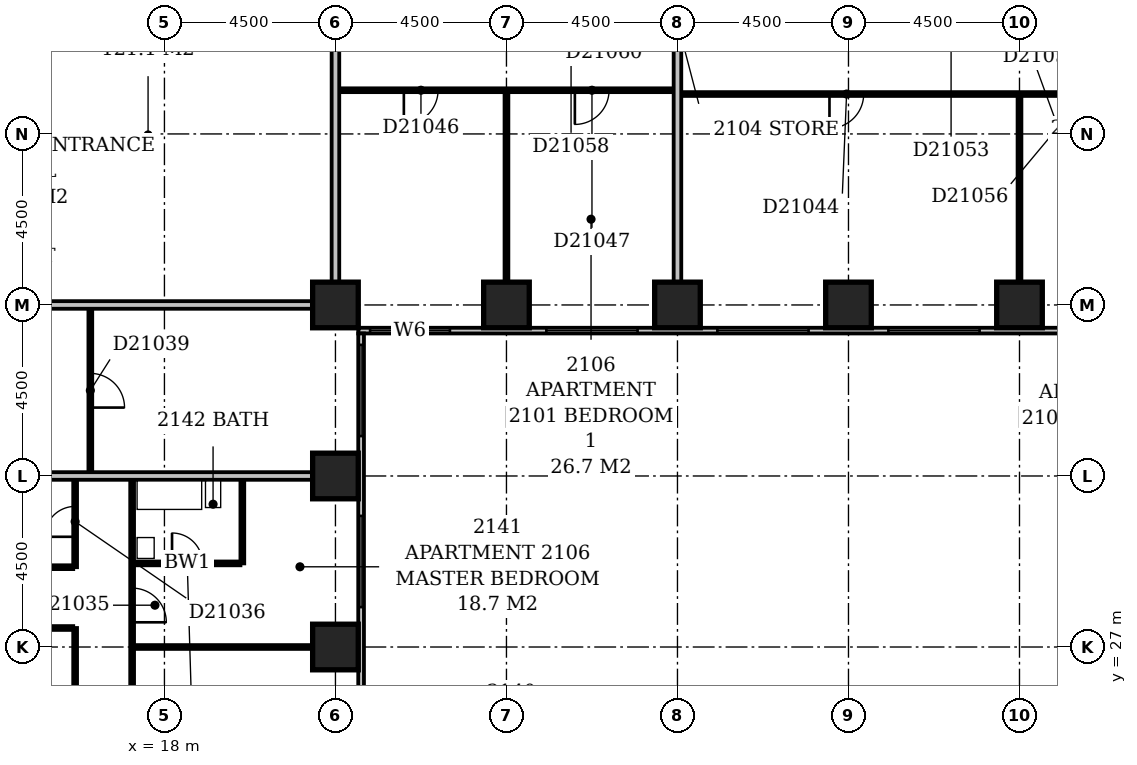
"""IFC4 building model, lengths in metres.
Left out: names, types, materials, properties, quantities, classifications, styles, units other than length and angle.
Written with IfcOpenShell. Run it as: python <this file> out.ifc"""

import sys

from ifc_helpers import new_model, si_unit, direction, frame, frame_2d, origin, origin_2d, place, context, subcontext, project, spatial, rectangle, extrude, element, fill, save


model = new_model("IFC4")
c1 = context("Model", 3, precision=1e-05, world=origin(), true_north=direction((0.0, 1.0)))
c2 = subcontext(c1, "Body", "Model", "MODEL_VIEW")
j1 = project(units=[si_unit("LENGTHUNIT", "METRE"), si_unit("PLANEANGLEUNIT", "RADIAN")], contexts=[c1])
p1 = place(None, origin())
s1 = spatial("IfcSite", under=j1, at=p1, CompositionType="ELEMENT")
p2 = place(p1, origin())
s2 = spatial("IfcBuilding", under=s1, at=p2, CompositionType="ELEMENT")
p3 = place(p2, frame((0.0, 0.0, 86.6)))
s3 = spatial("IfcBuildingStorey", under=s2, at=p3, CompositionType="ELEMENT", Elevation=86.6)
for number, where, z_axis, x_axis in (
    (1, (22.5, 27.0, -0.3), (0.0, 0.0, 1.0), (1.0, 0.0, 0.0)),
    (2, (22.5, 31.5, -0.3), (0.0, 0.0, 1.0), (1.0, 0.0, 0.0)),
    (3, (22.5, 36.0, -0.3), (0.0, 0.0, 1.0), (1.0, 0.0, 0.0)),
    (4, (27.0, 36.0, -0.3), (0.0, 0.0, 1.0), (1.0, 0.0, 0.0)),
    (5, (31.5, 36.0, -0.3), (0.0, 0.0, 1.0), (1.0, 0.0, 0.0)),
    (6, (36.0, 36.0, -0.3), (0.0, 0.0, 1.0), (1.0, 0.0, 0.0)),
    (7, (40.5, 36.0, -0.3), (0.0, 0.0, 1.0), (1.0, 0.0, 0.0)),
):
    element("IfcColumn", number, at=place(p3, frame(where, z_axis=z_axis, x_axis=x_axis)), inside=s3, PredefinedType="COLUMN", context=c2, shape_type="SweptSolid", body=[
        extrude(rectangle(XDim=1.2, YDim=1.2, at=origin_2d()), origin(), (0.0, 0.0, 1.0), 3.6),
    ])
p4 = place(p3, frame((23.175, 17.4, 0.0), z_axis=(0.0, 0.0, 1.0), x_axis=(0.0, 1.0, 0.0)))
e8 = element("IfcWall", 8, at=p4, inside=s3, PredefinedType="STANDARD", context=c2, shape_type="SweptSolid", body=[
    extrude(rectangle(XDim=17.85, YDim=0.15, at=frame_2d((8.925, 0.0))), origin(), (0.0, 0.0, 1.0), 2.7),
])
p5 = place(p4, frame((1.435, 0.0, 0.6)))
e9 = element("IfcOpeningElement", 9, at=p5, cuts=e8, PredefinedType="OPENING", context=c2, shape_type="SweptSolid", body=[
    extrude(rectangle(XDim=2.1, YDim=1.8, at=frame_2d((1.05, 0.9))), frame((0.0, 0.087, 0.0), z_axis=(0.0, -1.0, 0.0), x_axis=(1.0, 0.0, 0.0)), (0.0, 0.0, 1.0), 0.174),
])
p6 = place(p4, frame((6.15, 0.0, 0.6)))
e10 = element("IfcOpeningElement", 10, at=p6, cuts=e8, PredefinedType="OPENING", context=c2, shape_type="SweptSolid", body=[
    extrude(rectangle(XDim=2.4, YDim=1.8, at=frame_2d((1.2, 0.9))), frame((0.0, 0.087, 0.0), z_axis=(0.0, -1.0, 0.0), x_axis=(1.0, 0.0, 0.0)), (0.0, 0.0, 1.0), 0.174),
])
p7 = place(p4, frame((10.65, 0.0, 0.6)))
e11 = element("IfcOpeningElement", 11, at=p7, cuts=e8, PredefinedType="OPENING", context=c2, shape_type="SweptSolid", body=[
    extrude(rectangle(XDim=2.4, YDim=1.8, at=frame_2d((1.2, 0.9))), frame((0.0, 0.087, 0.0), z_axis=(0.0, -1.0, 0.0), x_axis=(1.0, 0.0, 0.0)), (0.0, 0.0, 1.0), 0.174),
])
p8 = place(p4, frame((15.15, 0.0, 0.6)))
e12 = element("IfcOpeningElement", 12, at=p8, cuts=e8, PredefinedType="OPENING", context=c2, shape_type="SweptSolid", body=[
    extrude(rectangle(XDim=2.4, YDim=1.8, at=frame_2d((1.2, 0.9))), frame((0.0, 0.087, 0.0), z_axis=(0.0, -1.0, 0.0), x_axis=(1.0, 0.0, 0.0)), (0.0, 0.0, 1.0), 0.174),
])
p9 = place(p3, frame((23.1, 35.325, 0.0), z_axis=(0.0, 0.0, 1.0), x_axis=(1.0, 0.0, 0.0)))
e13 = element("IfcWall", 13, at=p9, inside=s3, PredefinedType="STANDARD", context=c2, shape_type="SweptSolid", body=[
    extrude(rectangle(XDim=45.15, YDim=0.15, at=frame_2d((22.575, 0.0))), origin(), (0.0, 0.0, 1.0), 2.7),
])
p10 = place(p9, frame((0.312, 0.0, 0.6)))
e14 = element("IfcOpeningElement", 14, at=p10, cuts=e13, PredefinedType="OPENING", context=c2, shape_type="SweptSolid", body=[
    extrude(rectangle(XDim=2.1, YDim=1.8, at=frame_2d((1.05, 0.9))), frame((0.0, 0.087, 0.0), z_axis=(0.0, -1.0, 0.0), x_axis=(1.0, 0.0, 0.0)), (0.0, 0.0, 1.0), 0.174),
])
p11 = place(p9, frame((4.95, 0.0, 0.6)))
e15 = element("IfcOpeningElement", 15, at=p11, cuts=e13, PredefinedType="OPENING", context=c2, shape_type="SweptSolid", body=[
    extrude(rectangle(XDim=2.4, YDim=1.8, at=frame_2d((1.2, 0.9))), frame((0.0, 0.087, 0.0), z_axis=(0.0, -1.0, 0.0), x_axis=(1.0, 0.0, 0.0)), (0.0, 0.0, 1.0), 0.174),
])
p12 = place(p9, frame((9.45, 0.0, 0.6)))
e16 = element("IfcOpeningElement", 16, at=p12, cuts=e13, PredefinedType="OPENING", context=c2, shape_type="SweptSolid", body=[
    extrude(rectangle(XDim=2.4, YDim=1.8, at=frame_2d((1.2, 0.9))), frame((0.0, 0.087, 0.0), z_axis=(0.0, -1.0, 0.0), x_axis=(1.0, 0.0, 0.0)), (0.0, 0.0, 1.0), 0.174),
])
p13 = place(p9, frame((13.95, 0.0, 0.6)))
e17 = element("IfcOpeningElement", 17, at=p13, cuts=e13, PredefinedType="OPENING", context=c2, shape_type="SweptSolid", body=[
    extrude(rectangle(XDim=2.4, YDim=1.8, at=frame_2d((1.2, 0.9))), frame((0.0, 0.087, 0.0), z_axis=(0.0, -1.0, 0.0), x_axis=(1.0, 0.0, 0.0)), (0.0, 0.0, 1.0), 0.174),
])
p14 = place(p9, frame((18.45, 0.0, 0.6)))
e18 = element("IfcOpeningElement", 18, at=p14, cuts=e13, PredefinedType="OPENING", context=c2, shape_type="SweptSolid", body=[
    extrude(rectangle(XDim=2.4, YDim=1.8, at=frame_2d((1.2, 0.9))), frame((0.0, 0.087, 0.0), z_axis=(0.0, -1.0, 0.0), x_axis=(1.0, 0.0, 0.0)), (0.0, 0.0, 1.0), 0.174),
])
p15 = place(p9, frame((24.097, 0.0, 0.6)))
e19 = element("IfcOpeningElement", 19, at=p15, cuts=e13, PredefinedType="OPENING", context=c2, shape_type="SweptSolid", body=[
    extrude(rectangle(XDim=1.5, YDim=1.8, at=frame_2d((0.75, 0.9))), frame((0.0, 0.087, 0.0), z_axis=(0.0, -1.0, 0.0), x_axis=(1.0, 0.0, 0.0)), (0.0, 0.0, 1.0), 0.174),
])
p16 = place(p9, frame((27.331, 0.0, 0.6)))
e20 = element("IfcOpeningElement", 20, at=p16, cuts=e13, PredefinedType="OPENING", context=c2, shape_type="SweptSolid", body=[
    extrude(rectangle(XDim=2.1, YDim=1.8, at=frame_2d((1.05, 0.9))), frame((0.0, 0.087, 0.0), z_axis=(0.0, -1.0, 0.0), x_axis=(1.0, 0.0, 0.0)), (0.0, 0.0, 1.0), 0.174),
])
p17 = place(p9, frame((31.95, 0.0, 0.6)))
e21 = element("IfcOpeningElement", 21, at=p17, cuts=e13, PredefinedType="OPENING", context=c2, shape_type="SweptSolid", body=[
    extrude(rectangle(XDim=2.4, YDim=1.8, at=frame_2d((1.2, 0.9))), frame((0.0, 0.087, 0.0), z_axis=(0.0, -1.0, 0.0), x_axis=(1.0, 0.0, 0.0)), (0.0, 0.0, 1.0), 0.174),
])
p18 = place(p9, frame((36.45, 0.0, 0.6)))
e22 = element("IfcOpeningElement", 22, at=p18, cuts=e13, PredefinedType="OPENING", context=c2, shape_type="SweptSolid", body=[
    extrude(rectangle(XDim=2.4, YDim=1.8, at=frame_2d((1.2, 0.9))), frame((0.0, 0.087, 0.0), z_axis=(0.0, -1.0, 0.0), x_axis=(1.0, 0.0, 0.0)), (0.0, 0.0, 1.0), 0.174),
])
p19 = place(p9, frame((40.95, 0.0, 0.6)))
e23 = element("IfcOpeningElement", 23, at=p19, cuts=e13, PredefinedType="OPENING", context=c2, shape_type="SweptSolid", body=[
    extrude(rectangle(XDim=2.4, YDim=1.8, at=frame_2d((1.2, 0.9))), frame((0.0, 0.087, 0.0), z_axis=(0.0, -1.0, 0.0), x_axis=(1.0, 0.0, 0.0)), (0.0, 0.0, 1.0), 0.174),
])
p20 = place(p3, frame((15.65, 22.6, 0.0), z_axis=(0.0, 0.0, 1.0), x_axis=(0.0, 1.0, 0.0)))
e24 = element("IfcWall", 24, at=p20, inside=s3, PredefinedType="PARTITIONING", context=c2, shape_type="SweptSolid", body=[
    extrude(rectangle(XDim=4.9, YDim=0.1, at=frame_2d((2.45, 0.0))), origin(), (0.0, 0.0, 1.0), 3.3),
])
p21 = place(p20, frame((1.95, 0.0, 0.0)))
e25 = element("IfcOpeningElement", 25, at=p21, cuts=e24, PredefinedType="OPENING", context=c2, shape_type="SweptSolid", body=[
    extrude(rectangle(XDim=0.9, YDim=2.1, at=frame_2d((0.45, 1.05))), frame((0.0, 0.062, 0.0), z_axis=(0.0, -1.0, 0.0), x_axis=(1.0, 0.0, 0.0)), (0.0, 0.0, 1.0), 0.124),
])
p22 = place(p3, frame((17.15, 22.6, 0.0), z_axis=(0.0, 0.0, 1.0), x_axis=(0.0, 1.0, 0.0)))
e26 = element("IfcWall", 26, at=p22, inside=s3, PredefinedType="PARTITIONING", context=c2, shape_type="SweptSolid", body=[
    extrude(rectangle(XDim=8.8, YDim=0.1, at=frame_2d((4.4, 0.0))), origin(), (0.0, 0.0, 1.0), 3.3),
])
p23 = place(p22, frame((1.7, 0.0, 0.0)))
e27 = element("IfcOpeningElement", 27, at=p23, cuts=e26, PredefinedType="OPENING", context=c2, shape_type="SweptSolid", body=[
    extrude(rectangle(XDim=0.9, YDim=2.1, at=frame_2d((0.45, 1.05))), frame((0.0, 0.062, 0.0), z_axis=(0.0, -1.0, 0.0), x_axis=(1.0, 0.0, 0.0)), (0.0, 0.0, 1.0), 0.124),
])
p24 = place(p22, frame((5.05, 0.0, 0.0)))
e28 = element("IfcOpeningElement", 28, at=p24, cuts=e26, PredefinedType="OPENING", context=c2, shape_type="SweptSolid", body=[
    extrude(rectangle(XDim=0.9, YDim=2.1, at=frame_2d((0.45, 1.05))), frame((0.0, 0.062, 0.0), z_axis=(0.0, -1.0, 0.0), x_axis=(1.0, 0.0, 0.0)), (0.0, 0.0, 1.0), 0.124),
])
p25 = place(p3, frame((17.2, 27.0, 0.0), z_axis=(0.0, 0.0, 1.0), x_axis=(1.0, 0.0, 0.0)))
e29 = element("IfcWall", 29, at=p25, inside=s3, PredefinedType="PARTITIONING", context=c2, shape_type="SweptSolid", body=[
    extrude(rectangle(XDim=4.7, YDim=0.1, at=frame_2d((2.35, 0.0))), origin(), (0.0, 0.0, 1.0), 2.7),
])
p26 = place(p3, frame((9.1, 27.5, 0.0), z_axis=(0.0, 0.0, 1.0), x_axis=(1.0, 0.0, 0.0)))
e30 = element("IfcWall", 30, at=p26, inside=s3, PredefinedType="PARTITIONING", context=c2, shape_type="SweptSolid", body=[
    extrude(rectangle(XDim=6.5, YDim=0.1, at=frame_2d((3.25, 0.0))), origin(), (0.0, 0.0, 1.0), 2.7),
])
p27 = place(p3, frame((9.1, 29.1, 0.0), z_axis=(0.0, 0.0, 1.0), x_axis=(1.0, 0.0, 0.0)))
e31 = element("IfcWall", 31, at=p27, inside=s3, PredefinedType="PLUMBINGWALL", context=c2, shape_type="SweptSolid", body=[
    extrude(rectangle(XDim=6.5, YDim=0.1, at=frame_2d((3.25, 0.0))), origin(), (0.0, 0.0, 1.0), 3.3),
])
p28 = place(p3, frame((15.65, 29.1, 0.0), z_axis=(0.0, 0.0, 1.0), x_axis=(0.0, 1.0, 0.0)))
e32 = element("IfcWall", 32, at=p28, inside=s3, PredefinedType="PARTITIONING", context=c2, shape_type="SweptSolid", body=[
    extrude(rectangle(XDim=2.3, YDim=0.1, at=frame_2d((1.15, 0.0))), origin(), (0.0, 0.0, 1.0), 3.3),
])
p29 = place(p28, frame((0.8, 0.0, 0.0)))
e33 = element("IfcOpeningElement", 33, at=p29, cuts=e32, PredefinedType="OPENING", context=c2, shape_type="SweptSolid", body=[
    extrude(rectangle(XDim=0.8, YDim=2.1, at=frame_2d((0.4, 1.05))), frame((0.0, 0.062, 0.0), z_axis=(0.0, -1.0, 0.0), x_axis=(1.0, 0.0, 0.0)), (0.0, 0.0, 1.0), 0.124),
])
p30 = place(p3, frame((17.2, 29.2, 0.0), z_axis=(0.0, 0.0, 1.0), x_axis=(1.0, 0.0, 0.0)))
e34 = element("IfcWall", 34, at=p30, inside=s3, PredefinedType="PLUMBINGWALL", context=c2, shape_type="SweptSolid", body=[
    extrude(rectangle(XDim=2.8, YDim=0.1, at=frame_2d((1.4, 0.0))), origin(), (0.0, 0.0, 1.0), 3.3),
])
p31 = place(p30, frame((1.0, 0.0, 0.0)))
e35 = element("IfcOpeningElement", 35, at=p31, cuts=e34, PredefinedType="OPENING", context=c2, shape_type="SweptSolid", body=[
    extrude(rectangle(XDim=0.8, YDim=2.1, at=frame_2d((0.4, 1.05))), frame((0.0, 0.062, 0.0), z_axis=(0.0, -1.0, 0.0), x_axis=(1.0, 0.0, 0.0)), (0.0, 0.0, 1.0), 0.124),
])
p32 = place(p3, frame((20.05, 29.2, 0.0), z_axis=(0.0, 0.0, 1.0), x_axis=(0.0, 1.0, 0.0)))
e36 = element("IfcWall", 36, at=p32, inside=s3, PredefinedType="PLUMBINGWALL", context=c2, shape_type="SweptSolid", body=[
    extrude(rectangle(XDim=2.2, YDim=0.1, at=frame_2d((1.1, 0.0))), origin(), (0.0, 0.0, 1.0), 3.3),
])
p33 = place(p3, frame((9.1, 31.5, 0.0), z_axis=(0.0, 0.0, 1.0), x_axis=(1.0, 0.0, 0.0)))
e37 = element("IfcWall", 37, at=p33, inside=s3, PredefinedType="PARTITIONING", context=c2, shape_type="SweptSolid", body=[
    extrude(rectangle(XDim=12.8, YDim=0.2, at=frame_2d((6.4, 0.0))), origin(), (0.0, 0.0, 1.0), 3.3),
])
p34 = place(p3, frame((16.05, 31.6, 0.0), z_axis=(0.0, 0.0, 1.0), x_axis=(0.0, 1.0, 0.0)))
e38 = element("IfcWall", 38, at=p34, inside=s3, PredefinedType="PARTITIONING", context=c2, shape_type="SweptSolid", body=[
    extrude(rectangle(XDim=4.3, YDim=0.1, at=frame_2d((2.15, 0.0))), origin(), (0.0, 0.0, 1.0), 3.3),
])
p35 = place(p34, frame((1.7, 0.0, 0.0)))
e39 = element("IfcOpeningElement", 39, at=p35, cuts=e38, PredefinedType="OPENING", context=c2, shape_type="SweptSolid", body=[
    extrude(rectangle(XDim=0.9, YDim=2.1, at=frame_2d((0.45, 1.05))), frame((0.0, 0.062, 0.0), z_axis=(0.0, -1.0, 0.0), x_axis=(1.0, 0.0, 0.0)), (0.0, 0.0, 1.0), 0.124),
])
p36 = place(p3, frame((9.1, 36.0, 0.0), z_axis=(0.0, 0.0, 1.0), x_axis=(1.0, 0.0, 0.0)))
e40 = element("IfcWall", 40, at=p36, inside=s3, PredefinedType="PARTITIONING", context=c2, shape_type="SweptSolid", body=[
    extrude(rectangle(XDim=12.8, YDim=0.2, at=frame_2d((6.4, 0.0))), origin(), (0.0, 0.0, 1.0), 2.4),
])
p37 = place(p3, frame((22.5, 36.6, 0.0), z_axis=(0.0, 0.0, 1.0), x_axis=(0.0, 1.0, 0.0)))
e41 = element("IfcWall", 41, at=p37, inside=s3, PredefinedType="PARTITIONING", context=c2, shape_type="SweptSolid", body=[
    extrude(rectangle(XDim=12.8, YDim=0.2, at=frame_2d((6.4, 0.0))), origin(), (0.0, 0.0, 1.0), 3.3),
])
p38 = place(p3, frame((27.0, 36.6, 0.0), z_axis=(0.0, 0.0, 1.0), x_axis=(0.0, 1.0, 0.0)))
e42 = element("IfcWall", 42, at=p38, inside=s3, PredefinedType="PARTITIONING", context=c2, shape_type="SweptSolid", body=[
    extrude(rectangle(XDim=5.0, YDim=0.1, at=frame_2d((2.5, 0.0))), origin(), (0.0, 0.0, 1.0), 2.6),
])
p39 = place(p3, frame((31.5, 36.6, 0.0), z_axis=(0.0, 0.0, 1.0), x_axis=(0.0, 1.0, 0.0)))
e43 = element("IfcWall", 43, at=p39, inside=s3, PredefinedType="PARTITIONING", context=c2, shape_type="SweptSolid", body=[
    extrude(rectangle(XDim=12.8, YDim=0.2, at=frame_2d((6.4, 0.0))), origin(), (0.0, 0.0, 1.0), 3.3),
])
p40 = place(p3, frame((40.5, 36.6, 0.0), z_axis=(0.0, 0.0, 1.0), x_axis=(0.0, 1.0, 0.0)))
e44 = element("IfcWall", 44, at=p40, inside=s3, PredefinedType="PARTITIONING", context=c2, shape_type="SweptSolid", body=[
    extrude(rectangle(XDim=4.9, YDim=0.1, at=frame_2d((2.45, 0.0))), origin(), (0.0, 0.0, 1.0), 3.3),
])
p41 = place(p3, frame((31.6, 41.55, 0.0), z_axis=(0.0, 0.0, 1.0), x_axis=(1.0, 0.0, 0.0)))
e45 = element("IfcWall", 45, at=p41, inside=s3, PredefinedType="PARTITIONING", context=c2, shape_type="SweptSolid", body=[
    extrude(rectangle(XDim=13.3, YDim=0.1, at=frame_2d((6.65, 0.0))), origin(), (0.0, 0.0, 1.0), 3.3),
])
p42 = place(p41, frame((3.9, 0.0, 0.0)))
e46 = element("IfcOpeningElement", 46, at=p42, cuts=e45, PredefinedType="OPENING", context=c2, shape_type="SweptSolid", body=[
    extrude(rectangle(XDim=0.9, YDim=2.1, at=frame_2d((0.45, 1.05))), frame((0.0, 0.062, 0.0), z_axis=(0.0, -1.0, 0.0), x_axis=(1.0, 0.0, 0.0)), (0.0, 0.0, 1.0), 0.124),
])
p43 = place(p41, frame((10.7, 0.0, 0.0)))
e47 = element("IfcOpeningElement", 47, at=p43, cuts=e45, PredefinedType="OPENING", context=c2, shape_type="SweptSolid", body=[
    extrude(rectangle(XDim=0.9, YDim=2.1, at=frame_2d((0.45, 1.05))), frame((0.0, 0.062, 0.0), z_axis=(0.0, -1.0, 0.0), x_axis=(1.0, 0.0, 0.0)), (0.0, 0.0, 1.0), 0.124),
])
p44 = place(p3, frame((22.6, 41.65, 0.0), z_axis=(0.0, 0.0, 1.0), x_axis=(1.0, 0.0, 0.0)))
e48 = element("IfcWall", 48, at=p44, inside=s3, PredefinedType="PARTITIONING", context=c2, shape_type="SweptSolid", body=[
    extrude(rectangle(XDim=8.8, YDim=0.1, at=frame_2d((4.4, 0.0))), origin(), (0.0, 0.0, 1.0), 3.3),
])
p45 = place(p44, frame((1.7, 0.0, 0.0)))
e49 = element("IfcOpeningElement", 49, at=p45, cuts=e48, PredefinedType="OPENING", context=c2, shape_type="SweptSolid", body=[
    extrude(rectangle(XDim=0.9, YDim=2.1, at=frame_2d((0.45, 1.05))), frame((0.0, 0.062, 0.0), z_axis=(0.0, -1.0, 0.0), x_axis=(1.0, 0.0, 0.0)), (0.0, 0.0, 1.0), 0.124),
])
p46 = place(p44, frame((6.2, 0.0, 0.0)))
e50 = element("IfcOpeningElement", 50, at=p46, cuts=e48, PredefinedType="OPENING", context=c2, shape_type="SweptSolid", body=[
    extrude(rectangle(XDim=0.9, YDim=2.1, at=frame_2d((0.45, 1.05))), frame((0.0, 0.062, 0.0), z_axis=(0.0, -1.0, 0.0), x_axis=(1.0, 0.0, 0.0)), (0.0, 0.0, 1.0), 0.124),
])
p47 = place(p7, origin())
e51 = element("IfcWindow", 51, at=p47, inside=s3, PartitioningType="SINGLE_PANEL", PredefinedType="WINDOW", context=c2, shape_type="SweptSolid", body=[
    extrude(rectangle(XDim=2.4, YDim=1.8, at=frame_2d((1.2, 0.9))), frame((0.0, 0.03, 0.0), z_axis=(0.0, -1.0, 0.0), x_axis=(1.0, 0.0, 0.0)), (0.0, 0.0, 1.0), 0.06),
])
fill(e11, e51)
p48 = place(p8, origin())
e52 = element("IfcWindow", 52, at=p48, inside=s3, PartitioningType="SINGLE_PANEL", PredefinedType="WINDOW", context=c2, shape_type="SweptSolid", body=[
    extrude(rectangle(XDim=2.4, YDim=1.8, at=frame_2d((1.2, 0.9))), frame((0.0, 0.03, 0.0), z_axis=(0.0, -1.0, 0.0), x_axis=(1.0, 0.0, 0.0)), (0.0, 0.0, 1.0), 0.06),
])
fill(e12, e52)
p49 = place(p10, origin())
e53 = element("IfcWindow", 53, at=p49, inside=s3, PartitioningType="SINGLE_PANEL", PredefinedType="WINDOW", context=c2, shape_type="SweptSolid", body=[
    extrude(rectangle(XDim=2.1, YDim=1.8, at=frame_2d((1.05, 0.9))), frame((0.0, 0.03, 0.0), z_axis=(0.0, -1.0, 0.0), x_axis=(1.0, 0.0, 0.0)), (0.0, 0.0, 1.0), 0.06),
])
fill(e14, e53)
p50 = place(p11, origin())
e54 = element("IfcWindow", 54, at=p50, inside=s3, PartitioningType="SINGLE_PANEL", PredefinedType="WINDOW", context=c2, shape_type="SweptSolid", body=[
    extrude(rectangle(XDim=2.4, YDim=1.8, at=frame_2d((1.2, 0.9))), frame((0.0, 0.03, 0.0), z_axis=(0.0, -1.0, 0.0), x_axis=(1.0, 0.0, 0.0)), (0.0, 0.0, 1.0), 0.06),
])
fill(e15, e54)
p51 = place(p12, origin())
e55 = element("IfcWindow", 55, at=p51, inside=s3, PartitioningType="SINGLE_PANEL", PredefinedType="WINDOW", context=c2, shape_type="SweptSolid", body=[
    extrude(rectangle(XDim=2.4, YDim=1.8, at=frame_2d((1.2, 0.9))), frame((0.0, 0.03, 0.0), z_axis=(0.0, -1.0, 0.0), x_axis=(1.0, 0.0, 0.0)), (0.0, 0.0, 1.0), 0.06),
])
fill(e16, e55)
p52 = place(p13, origin())
e56 = element("IfcWindow", 56, at=p52, inside=s3, PartitioningType="SINGLE_PANEL", PredefinedType="WINDOW", context=c2, shape_type="SweptSolid", body=[
    extrude(rectangle(XDim=2.4, YDim=1.8, at=frame_2d((1.2, 0.9))), frame((0.0, 0.03, 0.0), z_axis=(0.0, -1.0, 0.0), x_axis=(1.0, 0.0, 0.0)), (0.0, 0.0, 1.0), 0.06),
])
fill(e17, e56)
p53 = place(p24, frame((0.9, 0.0, 0.0), z_axis=(0.0, 0.0, 1.0), x_axis=(-1.0, 0.0, 0.0)))
e57 = element("IfcDoor", 57, at=p53, inside=s3, OperationType="SINGLE_SWING_RIGHT", PredefinedType="DOOR", context=c2, shape_type="SweptSolid", body=[
    extrude(rectangle(XDim=0.9, YDim=2.1, at=frame_2d((0.45, 1.05))), frame((0.0, 0.025, 0.0), z_axis=(0.0, -1.0, 0.0), x_axis=(1.0, 0.0, 0.0)), (0.0, 0.0, 1.0), 0.05),
])
fill(e28, e57)
p54 = place(p29, origin())
e58 = element("IfcDoor", 58, at=p54, inside=s3, OperationType="SINGLE_SWING_LEFT", PredefinedType="DOOR", context=c2, shape_type="SweptSolid", body=[
    extrude(rectangle(XDim=0.8, YDim=2.1, at=frame_2d((0.4, 1.05))), frame((0.0, 0.025, 0.0), z_axis=(0.0, -1.0, 0.0), x_axis=(1.0, 0.0, 0.0)), (0.0, 0.0, 1.0), 0.05),
])
fill(e33, e58)
p55 = place(p31, origin())
e59 = element("IfcDoor", 59, at=p55, inside=s3, OperationType="SINGLE_SWING_LEFT", PredefinedType="DOOR", context=c2, shape_type="SweptSolid", body=[
    extrude(rectangle(XDim=0.8, YDim=2.1, at=frame_2d((0.4, 1.05))), frame((0.0, 0.025, 0.0), z_axis=(0.0, -1.0, 0.0), x_axis=(1.0, 0.0, 0.0)), (0.0, 0.0, 1.0), 0.05),
])
fill(e35, e59)
p56 = place(p35, frame((0.9, 0.0, 0.0), z_axis=(0.0, 0.0, 1.0), x_axis=(-1.0, 0.0, 0.0)))
e60 = element("IfcDoor", 60, at=p56, inside=s3, OperationType="SINGLE_SWING_RIGHT", PredefinedType="DOOR", context=c2, shape_type="SweptSolid", body=[
    extrude(rectangle(XDim=0.9, YDim=2.1, at=frame_2d((0.45, 1.05))), frame((0.0, 0.025, 0.0), z_axis=(0.0, -1.0, 0.0), x_axis=(1.0, 0.0, 0.0)), (0.0, 0.0, 1.0), 0.05),
])
fill(e39, e60)
p57 = place(p42, frame((0.9, 0.0, 0.0), z_axis=(0.0, 0.0, 1.0), x_axis=(-1.0, 0.0, 0.0)))
e61 = element("IfcDoor", 61, at=p57, inside=s3, OperationType="SINGLE_SWING_RIGHT", PredefinedType="DOOR", context=c2, shape_type="SweptSolid", body=[
    extrude(rectangle(XDim=0.9, YDim=2.1, at=frame_2d((0.45, 1.05))), frame((0.0, 0.025, 0.0), z_axis=(0.0, -1.0, 0.0), x_axis=(1.0, 0.0, 0.0)), (0.0, 0.0, 1.0), 0.05),
])
fill(e46, e61)
p58 = place(p45, frame((0.9, 0.0, 0.0), z_axis=(0.0, 0.0, 1.0), x_axis=(-1.0, 0.0, 0.0)))
e62 = element("IfcDoor", 62, at=p58, inside=s3, OperationType="SINGLE_SWING_RIGHT", PredefinedType="DOOR", context=c2, shape_type="SweptSolid", body=[
    extrude(rectangle(XDim=0.9, YDim=2.1, at=frame_2d((0.45, 1.05))), frame((0.0, 0.025, 0.0), z_axis=(0.0, -1.0, 0.0), x_axis=(1.0, 0.0, 0.0)), (0.0, 0.0, 1.0), 0.05),
])
fill(e49, e62)
p59 = place(p46, frame((0.9, 0.0, 0.0), z_axis=(0.0, 0.0, 1.0), x_axis=(-1.0, 0.0, 0.0)))
e63 = element("IfcDoor", 63, at=p59, inside=s3, OperationType="SINGLE_SWING_RIGHT", PredefinedType="DOOR", context=c2, shape_type="SweptSolid", body=[
    extrude(rectangle(XDim=0.9, YDim=2.1, at=frame_2d((0.45, 1.05))), frame((0.0, 0.025, 0.0), z_axis=(0.0, -1.0, 0.0), x_axis=(1.0, 0.0, 0.0)), (0.0, 0.0, 1.0), 0.05),
])
fill(e50, e63)
save(model, sys.argv[1])
